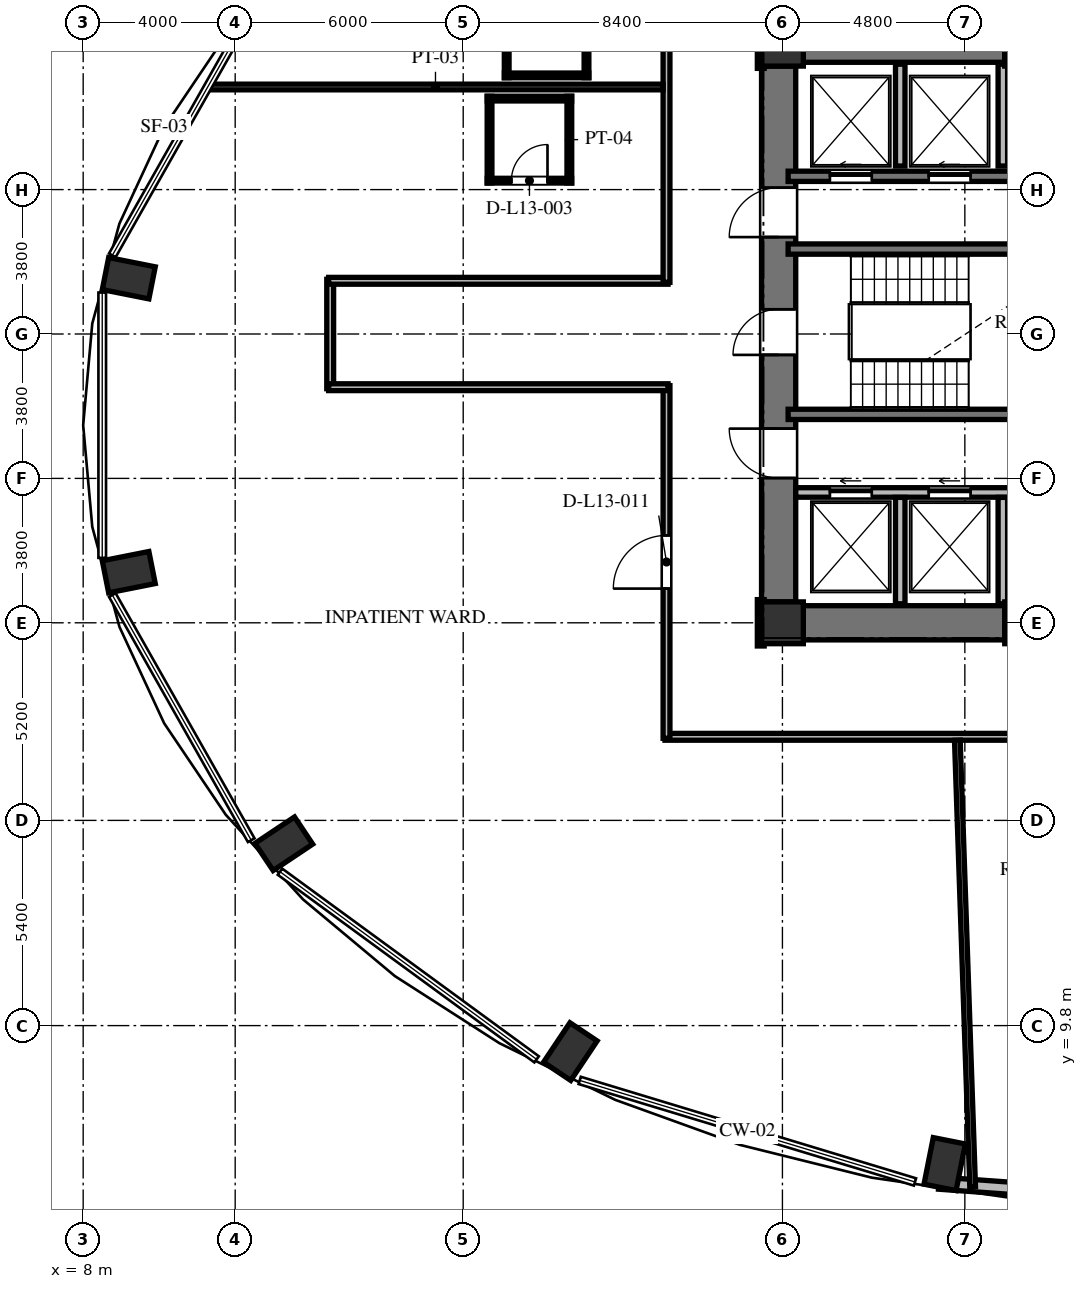
"""IFC4 building model, lengths in metres.
Left out: names, types, materials, properties, quantities, classifications, styles, units other than length and angle.
Written with IfcOpenShell. Run it as: python <this file> out.ifc"""

import sys

from ifc_helpers import new_model, si_unit, direction, frame, frame_2d, origin, origin_2d, place, context, subcontext, project, spatial, rectangle, extrude, element, fill, save


model = new_model("IFC4")
c1 = context("Model", 3, precision=1e-05, world=origin(), true_north=direction((0.0, 1.0)))
c2 = subcontext(c1, "Body", "Model", "MODEL_VIEW")
j1 = project(units=[si_unit("LENGTHUNIT", "METRE"), si_unit("PLANEANGLEUNIT", "RADIAN")], contexts=[c1])
p1 = place(None, origin())
s1 = spatial("IfcSite", under=j1, at=p1, CompositionType="ELEMENT")
p2 = place(p1, origin())
s2 = spatial("IfcBuilding", under=s1, at=p2, CompositionType="ELEMENT")
p3 = place(p2, frame((0.0, 0.0, 54.384)))
s3 = spatial("IfcBuildingStorey", under=s2, at=p3, CompositionType="ELEMENT", Elevation=54.384)
for number, where, z_axis, x_axis in (
    (1, (9.2, 29.468, 0.0), (0.0, 0.0, 1.0), (-0.981, 0.195, 0.0)),
    (2, (9.2, 21.732, 0.0), (0.0, 0.0, 1.0), (-0.981, -0.195, 0.0)),
    (3, (13.28, 14.586, 0.0), (0.0, 0.0, 1.0), (-0.831, -0.556, 0.0)),
    (4, (20.819, 9.116, 0.0), (0.0, 0.0, 1.0), (-0.556, -0.831, 0.0)),
    (5, (30.669, 6.156, 0.0), (0.0, 0.0, 1.0), (-0.195, -0.981, 0.0)),
):
    element("IfcColumn", number, at=place(p3, frame(where, z_axis=z_axis, x_axis=x_axis)), inside=s3, PredefinedType="COLUMN", context=c2, shape_type="SweptSolid", body=[
        extrude(rectangle(XDim=1.25, YDim=0.86, at=origin_2d()), origin(), (0.0, 0.0, 1.0), 3.648),
    ])
for number, where, z_axis, x_axis in (
    (6, (26.4, 20.4, 0.0), (0.0, 0.0, 1.0), (1.0, 0.0, 0.0)),
    (7, (32.8, 20.4, 0.0), (0.0, 0.0, 1.0), (1.0, 0.0, 0.0)),
    (8, (32.8, 35.6, 0.0), (0.0, 0.0, 1.0), (1.0, 0.0, 0.0)),
    (9, (26.4, 35.6, 0.0), (0.0, 0.0, 1.0), (1.0, 0.0, 0.0)),
):
    element("IfcColumn", number, at=place(p3, frame(where, z_axis=z_axis, x_axis=x_axis)), inside=s3, PredefinedType="COLUMN", context=c2, shape_type="SweptSolid", body=[
        extrude(rectangle(XDim=1.1, YDim=1.1, at=origin_2d()), origin(), (0.0, 0.0, 1.0), 3.648),
    ])
p4 = place(p3, frame((26.3, 20.95, 0.0), z_axis=(0.0, 0.0, 1.0), x_axis=(0.0, 1.0, 0.0)))
e10 = element("IfcWall", 10, at=p4, inside=s3, PredefinedType="SHEAR", context=c2, shape_type="SweptSolid", body=[
    extrude(rectangle(XDim=14.1, YDim=0.9, at=frame_2d((7.05, 0.0))), origin(), (0.0, 0.0, 1.0), 3.648),
])
p5 = place(p4, frame((6.5, 0.0, 0.0)))
e11 = element("IfcOpeningElement", 11, at=p5, cuts=e10, PredefinedType="OPENING", context=c2, shape_type="SweptSolid", body=[
    extrude(rectangle(XDim=1.2, YDim=2.15, at=frame_2d((0.6, 1.075))), frame((0.0, 0.46, 0.0), z_axis=(0.0, -1.0, 0.0), x_axis=(1.0, 0.0, 0.0)), (0.0, 0.0, 1.0), 0.92),
])
p6 = place(p4, frame((9.6, 0.0, 0.0)))
e12 = element("IfcOpeningElement", 12, at=p6, cuts=e10, PredefinedType="OPENING", context=c2, shape_type="SweptSolid", body=[
    extrude(rectangle(XDim=1.3, YDim=2.2, at=frame_2d((0.65, 1.1))), frame((0.0, 0.46, 0.0), z_axis=(0.0, -1.0, 0.0), x_axis=(1.0, 0.0, 0.0)), (0.0, 0.0, 1.0), 0.92),
])
p7 = place(p4, frame((3.26, 0.0, 0.0)))
e13 = element("IfcOpeningElement", 13, at=p7, cuts=e10, PredefinedType="OPENING", context=c2, shape_type="SweptSolid", body=[
    extrude(rectangle(XDim=1.3, YDim=2.2, at=frame_2d((0.65, 1.1))), frame((0.0, 0.46, 0.0), z_axis=(0.0, -1.0, 0.0), x_axis=(1.0, 0.0, 0.0)), (0.0, 0.0, 1.0), 0.92),
])
for number, where, z_axis, x_axis in (
    (14, (26.95, 20.4, 0.0), (0.0, 0.0, 1.0), (1.0, 0.0, 0.0)),
    (15, (26.95, 35.6, 0.0), (0.0, 0.0, 1.0), (1.0, 0.0, 0.0)),
):
    element("IfcWall", number, at=place(p3, frame(where, z_axis=z_axis, x_axis=x_axis)), inside=s3, PredefinedType="SHEAR", context=c2, shape_type="SweptSolid", body=[
        extrude(rectangle(XDim=5.3, YDim=0.9, at=frame_2d((2.65, 0.0))), origin(), (0.0, 0.0, 1.0), 3.648),
    ])
p8 = place(p3, frame((30.519, 5.654, 0.0), z_axis=(0.0, 0.0, 1.0), x_axis=(0.997421878774, -0.071760683825, 0.0)))
e16 = element("IfcWall", 16, at=p8, inside=s3, PredefinedType="SOLIDWALL", context=c2, shape_type="SweptSolid", body=[
    extrude(rectangle(XDim=5.675, YDim=0.32, at=frame_2d((2.837, 0.0))), origin(), (0.0, 0.0, 1.0), 3.428),
])
p9 = place(p8, frame((2.237, 0.0, 0.85)))
e17 = element("IfcOpeningElement", 17, at=p9, cuts=e16, PredefinedType="OPENING", context=c2, shape_type="SweptSolid", body=[
    extrude(rectangle(XDim=1.2, YDim=2.2, at=frame_2d((0.6, 1.1))), frame((0.0, 0.17, 0.0), z_axis=(0.0, -1.0, 0.0), x_axis=(1.0, 0.0, 0.0)), (0.0, 0.0, 1.0), 0.34),
])
for number, where, z_axis, x_axis in (
    (18, (26.55, 30.235, 0.0), (0.0, 0.0, 1.0), (1.0, 0.0, 0.0)),
    (19, (26.55, 25.885, 0.0), (0.0, 0.0, 1.0), (1.0, 0.0, 0.0)),
):
    element("IfcWall", number, at=place(p3, frame(where, z_axis=z_axis, x_axis=x_axis)), inside=s3, PredefinedType="SHEAR", context=c2, shape_type="SweptSolid", body=[
        extrude(rectangle(XDim=7.985, YDim=0.27, at=frame_2d((3.992, 0.0))), origin(), (0.0, 0.0, 1.0), 3.648),
    ])
p10 = place(p3, frame((26.55, 32.15, 0.0), z_axis=(0.0, 0.0, 1.0), x_axis=(1.0, 0.0, 0.0)))
e20 = element("IfcWall", 20, at=p10, inside=s3, PredefinedType="SHEAR", context=c2, shape_type="SweptSolid", body=[
    extrude(rectangle(XDim=16.4, YDim=0.27, at=frame_2d((8.2, 0.0))), origin(), (0.0, 0.0, 1.0), 3.648),
])
p11 = place(p10, frame((1.1, 0.0, 0.0)))
e21 = element("IfcOpeningElement", 21, at=p11, cuts=e20, PredefinedType="OPENING", context=c2, shape_type="SweptSolid", body=[
    extrude(rectangle(XDim=1.1, YDim=2.2, at=frame_2d((0.55, 1.1))), frame((0.0, 0.145, 0.0), z_axis=(0.0, -1.0, 0.0), x_axis=(1.0, 0.0, 0.0)), (0.0, 0.0, 1.0), 0.29),
])
p12 = place(p10, frame((3.7, 0.0, 0.0)))
e22 = element("IfcOpeningElement", 22, at=p12, cuts=e20, PredefinedType="OPENING", context=c2, shape_type="SweptSolid", body=[
    extrude(rectangle(XDim=1.1, YDim=2.2, at=frame_2d((0.55, 1.1))), frame((0.0, 0.145, 0.0), z_axis=(0.0, -1.0, 0.0), x_axis=(1.0, 0.0, 0.0)), (0.0, 0.0, 1.0), 0.29),
])
p13 = place(p10, frame((6.5, 0.0, 0.0)))
e23 = element("IfcOpeningElement", 23, at=p13, cuts=e20, PredefinedType="OPENING", context=c2, shape_type="SweptSolid", body=[
    extrude(rectangle(XDim=1.1, YDim=2.2, at=frame_2d((0.55, 1.1))), frame((0.0, 0.145, 0.0), z_axis=(0.0, -1.0, 0.0), x_axis=(1.0, 0.0, 0.0)), (0.0, 0.0, 1.0), 0.29),
])
p14 = place(p10, frame((9.1, 0.0, 0.0)))
e24 = element("IfcOpeningElement", 24, at=p14, cuts=e20, PredefinedType="OPENING", context=c2, shape_type="SweptSolid", body=[
    extrude(rectangle(XDim=1.1, YDim=2.2, at=frame_2d((0.55, 1.1))), frame((0.0, 0.145, 0.0), z_axis=(0.0, -1.0, 0.0), x_axis=(1.0, 0.0, 0.0)), (0.0, 0.0, 1.0), 0.29),
])
p15 = place(p10, frame((11.9, 0.0, 0.0)))
e25 = element("IfcOpeningElement", 25, at=p15, cuts=e20, PredefinedType="OPENING", context=c2, shape_type="SweptSolid", body=[
    extrude(rectangle(XDim=1.1, YDim=2.2, at=frame_2d((0.55, 1.1))), frame((0.0, 0.145, 0.0), z_axis=(0.0, -1.0, 0.0), x_axis=(1.0, 0.0, 0.0)), (0.0, 0.0, 1.0), 0.29),
])
p16 = place(p10, frame((14.5, 0.0, 0.0)))
e26 = element("IfcOpeningElement", 26, at=p16, cuts=e20, PredefinedType="OPENING", context=c2, shape_type="SweptSolid", body=[
    extrude(rectangle(XDim=1.1, YDim=2.2, at=frame_2d((0.55, 1.1))), frame((0.0, 0.145, 0.0), z_axis=(0.0, -1.0, 0.0), x_axis=(1.0, 0.0, 0.0)), (0.0, 0.0, 1.0), 0.29),
])
p17 = place(p3, frame((26.75, 23.83, 0.0), z_axis=(0.0, 0.0, 1.0), x_axis=(1.0, 0.0, 0.0)))
e27 = element("IfcWall", 27, at=p17, inside=s3, PredefinedType="SOLIDWALL", context=c2, shape_type="SweptSolid", body=[
    extrude(rectangle(XDim=16.2, YDim=0.25, at=frame_2d((8.1, 0.0))), origin(), (0.0, 0.0, 1.0), 3.428),
])
p18 = place(p17, frame((0.9, 0.0, 0.0)))
e28 = element("IfcOpeningElement", 28, at=p18, cuts=e27, PredefinedType="OPENING", context=c2, shape_type="SweptSolid", body=[
    extrude(rectangle(XDim=1.1, YDim=2.2, at=frame_2d((0.55, 1.1))), frame((0.0, 0.135, 0.0), z_axis=(0.0, -1.0, 0.0), x_axis=(1.0, 0.0, 0.0)), (0.0, 0.0, 1.0), 0.27),
])
p19 = place(p17, frame((3.5, 0.0, 0.0)))
e29 = element("IfcOpeningElement", 29, at=p19, cuts=e27, PredefinedType="OPENING", context=c2, shape_type="SweptSolid", body=[
    extrude(rectangle(XDim=1.1, YDim=2.2, at=frame_2d((0.55, 1.1))), frame((0.0, 0.135, 0.0), z_axis=(0.0, -1.0, 0.0), x_axis=(1.0, 0.0, 0.0)), (0.0, 0.0, 1.0), 0.27),
])
p20 = place(p17, frame((6.3, 0.0, 0.0)))
e30 = element("IfcOpeningElement", 30, at=p20, cuts=e27, PredefinedType="OPENING", context=c2, shape_type="SweptSolid", body=[
    extrude(rectangle(XDim=1.1, YDim=2.2, at=frame_2d((0.55, 1.1))), frame((0.0, 0.135, 0.0), z_axis=(0.0, -1.0, 0.0), x_axis=(1.0, 0.0, 0.0)), (0.0, 0.0, 1.0), 0.27),
])
p21 = place(p17, frame((8.9, 0.0, 0.0)))
e31 = element("IfcOpeningElement", 31, at=p21, cuts=e27, PredefinedType="OPENING", context=c2, shape_type="SweptSolid", body=[
    extrude(rectangle(XDim=1.1, YDim=2.2, at=frame_2d((0.55, 1.1))), frame((0.0, 0.135, 0.0), z_axis=(0.0, -1.0, 0.0), x_axis=(1.0, 0.0, 0.0)), (0.0, 0.0, 1.0), 0.27),
])
p22 = place(p17, frame((11.7, 0.0, 0.0)))
e32 = element("IfcOpeningElement", 32, at=p22, cuts=e27, PredefinedType="OPENING", context=c2, shape_type="SweptSolid", body=[
    extrude(rectangle(XDim=1.1, YDim=2.2, at=frame_2d((0.55, 1.1))), frame((0.0, 0.135, 0.0), z_axis=(0.0, -1.0, 0.0), x_axis=(1.0, 0.0, 0.0)), (0.0, 0.0, 1.0), 0.27),
])
p23 = place(p17, frame((14.15, 0.0, 0.0)))
e33 = element("IfcOpeningElement", 33, at=p23, cuts=e27, PredefinedType="OPENING", context=c2, shape_type="SweptSolid", body=[
    extrude(rectangle(XDim=1.4, YDim=2.3, at=frame_2d((0.7, 1.15))), frame((0.0, 0.135, 0.0), z_axis=(0.0, -1.0, 0.0), x_axis=(1.0, 0.0, 0.0)), (0.0, 0.0, 1.0), 0.27),
])
p24 = place(p3, frame((29.5, 32.42, 0.0), z_axis=(0.0, 0.0, 1.0), x_axis=(0.0, 1.0, 0.0)))
e34 = element("IfcWall", 34, at=p24, inside=s3, PredefinedType="SOLIDWALL", context=c2, shape_type="SweptSolid", body=[
    extrude(rectangle(XDim=2.68, YDim=0.25, at=frame_2d((1.34, 0.0))), origin(), (0.0, 0.0, 1.0), 3.428),
])
p25 = place(p3, frame((29.5, 20.9, 0.0), z_axis=(0.0, 0.0, 1.0), x_axis=(0.0, 1.0, 0.0)))
e35 = element("IfcWall", 35, at=p25, inside=s3, PredefinedType="SOLIDWALL", context=c2, shape_type="SweptSolid", body=[
    extrude(rectangle(XDim=2.8, YDim=0.25, at=frame_2d((1.4, 0.0))), origin(), (0.0, 0.0, 1.0), 3.428),
])
p26 = place(p3, frame((32.2, 32.42, 0.0), z_axis=(0.0, 0.0, 1.0), x_axis=(0.0, 1.0, 0.0)))
e36 = element("IfcWall", 36, at=p26, inside=s3, PredefinedType="SOLIDWALL", context=c2, shape_type="SweptSolid", body=[
    extrude(rectangle(XDim=2.68, YDim=0.25, at=frame_2d((1.34, 0.0))), origin(), (0.0, 0.0, 1.0), 3.428),
])
p27 = place(p3, frame((32.2, 20.9, 0.0), z_axis=(0.0, 0.0, 1.0), x_axis=(0.0, 1.0, 0.0)))
e37 = element("IfcWall", 37, at=p27, inside=s3, PredefinedType="SOLIDWALL", context=c2, shape_type="SweptSolid", body=[
    extrude(rectangle(XDim=2.8, YDim=0.25, at=frame_2d((1.4, 0.0))), origin(), (0.0, 0.0, 1.0), 3.428),
])
p28 = place(p3, frame((14.5, 26.56, 0.0), z_axis=(0.0, 0.0, 1.0), x_axis=(0.0, 1.0, 0.0)))
e38 = element("IfcWall", 38, at=p28, inside=s3, PredefinedType="PARTITIONING", context=c2, shape_type="SweptSolid", body=[
    extrude(rectangle(XDim=2.88, YDim=0.18, at=frame_2d((1.44, 0.0))), origin(), (0.0, 0.0, 1.0), 3.428),
])
p29 = place(p3, frame((14.46, 29.4, 0.0), z_axis=(0.0, 0.0, 1.0), x_axis=(1.0, 0.0, 0.0)))
e39 = element("IfcWall", 39, at=p29, inside=s3, PredefinedType="PARTITIONING", context=c2, shape_type="SweptSolid", body=[
    extrude(rectangle(XDim=8.93, YDim=0.18, at=frame_2d((4.465, 0.0))), origin(), (0.0, 0.0, 1.0), 3.428),
])
p30 = place(p3, frame((23.35, 29.36, 0.0), z_axis=(0.0, 0.0, 1.0), x_axis=(0.0, 1.0, 0.0)))
e40 = element("IfcWall", 40, at=p30, inside=s3, PredefinedType="PARTITIONING", context=c2, shape_type="SweptSolid", body=[
    extrude(rectangle(XDim=9.43, YDim=0.18, at=frame_2d((4.715, 0.0))), origin(), (0.0, 0.0, 1.0), 3.428),
])
for number, where, z_axis, x_axis in (
    (41, (25.83, 36.21, 0.0), (0.0, 0.0, 1.0), (0.0, -1.0, 0.0)),
    (42, (25.83, 21.01, 0.0), (0.0, 0.0, 1.0), (0.0, -1.0, 0.0)),
):
    element("IfcWall", number, at=place(p3, frame(where, z_axis=z_axis, x_axis=x_axis)), inside=s3, PredefinedType="PARTITIONING", context=c2, shape_type="SweptSolid", body=[
        extrude(rectangle(XDim=1.22, YDim=0.18, at=frame_2d((0.61, 0.0))), origin(), (0.0, 0.0, 1.0), 3.428),
    ])
p31 = place(p3, frame((45.24, 17.4, 0.0), z_axis=(0.0, 0.0, 1.0), x_axis=(-1.0, 0.0, 0.0)))
e43 = element("IfcWall", 43, at=p31, inside=s3, PredefinedType="PARTITIONING", context=c2, shape_type="SweptSolid", body=[
    extrude(rectangle(XDim=21.93, YDim=0.18, at=frame_2d((10.965, 0.0))), origin(), (0.0, 0.0, 1.0), 3.053),
])
p32 = place(p31, frame((9.289, 0.0, 0.0)))
e44 = element("IfcOpeningElement", 44, at=p32, cuts=e43, PredefinedType="OPENING", context=c2, shape_type="SweptSolid", body=[
    extrude(rectangle(XDim=1.4, YDim=2.2, at=frame_2d((0.7, 1.1))), frame((0.0, 0.1, 0.0), z_axis=(0.0, -1.0, 0.0), x_axis=(1.0, 0.0, 0.0)), (0.0, 0.0, 1.0), 0.2),
])
p33 = place(p31, frame((2.329, 0.0, 0.0)))
e45 = element("IfcOpeningElement", 45, at=p33, cuts=e43, PredefinedType="OPENING", context=c2, shape_type="SweptSolid", body=[
    extrude(rectangle(XDim=1.4, YDim=2.2, at=frame_2d((0.7, 1.1))), frame((0.0, 0.1, 0.0), z_axis=(0.0, -1.0, 0.0), x_axis=(1.0, 0.0, 0.0)), (0.0, 0.0, 1.0), 0.2),
])
p34 = place(p3, frame((23.35, 17.36, 0.0), z_axis=(0.0, 0.0, 1.0), x_axis=(0.0, 1.0, 0.0)))
e46 = element("IfcWall", 46, at=p34, inside=s3, PredefinedType="PARTITIONING", context=c2, shape_type="SweptSolid", body=[
    extrude(rectangle(XDim=9.28, YDim=0.18, at=frame_2d((4.64, 0.0))), origin(), (0.0, 0.0, 1.0), 3.428),
])
p35 = place(p34, frame((3.94, 0.0, 0.0)))
e47 = element("IfcOpeningElement", 47, at=p35, cuts=e46, PredefinedType="OPENING", context=c2, shape_type="SweptSolid", body=[
    extrude(rectangle(XDim=1.4, YDim=2.2, at=frame_2d((0.7, 1.1))), frame((0.0, 0.1, 0.0), z_axis=(0.0, -1.0, 0.0), x_axis=(1.0, 0.0, 0.0)), (0.0, 0.0, 1.0), 0.2),
])
p36 = place(p3, frame((23.39, 26.6, 0.0), z_axis=(0.0, 0.0, 1.0), x_axis=(-1.0, 0.0, 0.0)))
e48 = element("IfcWall", 48, at=p36, inside=s3, PredefinedType="PARTITIONING", context=c2, shape_type="SweptSolid", body=[
    extrude(rectangle(XDim=8.93, YDim=0.18, at=frame_2d((4.465, 0.0))), origin(), (0.0, 0.0, 1.0), 3.428),
])
p37 = place(p3, frame((11.281, 34.5, 0.0), z_axis=(0.0, 0.0, 1.0), x_axis=(1.0, 0.0, 0.0)))
e49 = element("IfcWall", 49, at=p37, inside=s3, PredefinedType="PARTITIONING", context=c2, shape_type="SweptSolid", body=[
    extrude(rectangle(XDim=11.979, YDim=0.15, at=frame_2d((5.99, 0.0))), origin(), (0.0, 0.0, 1.0), 3.428),
])
p38 = place(p3, frame((31.405, 5.559, 0.0), z_axis=(0.0, 0.0, 1.0), x_axis=(-0.034219123574, 0.9994143543, 0.0)))
e50 = element("IfcWall", 50, at=p38, inside=s3, PredefinedType="PARTITIONING", context=c2, shape_type="SweptSolid", body=[
    extrude(rectangle(XDim=11.758, YDim=0.15, at=frame_2d((5.879, 0.0))), origin(), (0.0, 0.0, 1.0), 2.813),
])
p39 = place(p3, frame((18.633, 34.195, 0.0), z_axis=(0.0, 0.0, 1.0), x_axis=(1.0, 0.0, 0.0)))
e51 = element("IfcWall", 51, at=p39, inside=s3, PredefinedType="PARTITIONING", context=c2, shape_type="SweptSolid", body=[
    extrude(rectangle(XDim=2.22, YDim=0.125, at=frame_2d((1.11, 0.0))), origin(), (0.0, 0.0, 1.0), 3.428),
])
p40 = place(p3, frame((18.633, 32.035, 0.0), z_axis=(0.0, 0.0, 1.0), x_axis=(1.0, 0.0, 0.0)))
e52 = element("IfcWall", 52, at=p40, inside=s3, PredefinedType="PARTITIONING", context=c2, shape_type="SweptSolid", body=[
    extrude(rectangle(XDim=2.22, YDim=0.125, at=frame_2d((1.11, 0.0))), origin(), (0.0, 0.0, 1.0), 3.428),
])
p41 = place(p40, frame((0.635, 0.0, 0.0)))
e53 = element("IfcOpeningElement", 53, at=p41, cuts=e52, PredefinedType="OPENING", context=c2, shape_type="SweptSolid", body=[
    extrude(rectangle(XDim=0.95, YDim=2.1, at=frame_2d((0.475, 1.05))), frame((0.0, 0.073, 0.0), z_axis=(0.0, -1.0, 0.0), x_axis=(1.0, 0.0, 0.0)), (0.0, 0.0, 1.0), 0.145),
])
for number, where, z_axis, x_axis in (
    (54, (20.793, 31.975, 0.0), (0.0, 0.0, 1.0), (0.0, 1.0, 0.0)),
    (55, (18.693, 31.975, 0.0), (0.0, 0.0, 1.0), (0.0, 1.0, 0.0)),
):
    element("IfcWall", number, at=place(p3, frame(where, z_axis=z_axis, x_axis=x_axis)), inside=s3, PredefinedType="PARTITIONING", context=c2, shape_type="SweptSolid", body=[
        extrude(rectangle(XDim=2.28, YDim=0.125, at=frame_2d((1.14, 0.0))), origin(), (0.0, 0.0, 1.0), 3.428),
    ])
p42 = place(p3, frame((19.084, 34.805, 0.0), z_axis=(0.0, 0.0, 1.0), x_axis=(1.0, 0.0, 0.0)))
e56 = element("IfcWall", 56, at=p42, inside=s3, PredefinedType="PARTITIONING", context=c2, shape_type="SweptSolid", body=[
    extrude(rectangle(XDim=2.22, YDim=0.125, at=frame_2d((1.11, 0.0))), origin(), (0.0, 0.0, 1.0), 3.428),
])
for number, where, z_axis, x_axis in (
    (57, (21.244, 34.745, 0.0), (0.0, 0.0, 1.0), (0.0, 1.0, 0.0)),
    (58, (19.144, 34.745, 0.0), (0.0, 0.0, 1.0), (0.0, 1.0, 0.0)),
):
    element("IfcWall", number, at=place(p3, frame(where, z_axis=z_axis, x_axis=x_axis)), inside=s3, PredefinedType="PARTITIONING", context=c2, shape_type="SweptSolid", body=[
        extrude(rectangle(XDim=2.28, YDim=0.125, at=frame_2d((1.14, 0.0))), origin(), (0.0, 0.0, 1.0), 3.428),
    ])
p43 = place(p5, origin())
e59 = element("IfcDoor", 59, at=p43, inside=s3, OperationType="SINGLE_SWING_LEFT", PredefinedType="DOOR", context=c2, shape_type="SweptSolid", body=[
    extrude(rectangle(XDim=1.2, YDim=2.15, at=frame_2d((0.6, 1.075))), frame((0.0, 0.025, 0.0), z_axis=(0.0, -1.0, 0.0), x_axis=(1.0, 0.0, 0.0)), (0.0, 0.0, 1.0), 0.05),
])
fill(e11, e59)
p44 = place(p6, origin())
e60 = element("IfcDoor", 60, at=p44, inside=s3, OperationType="SINGLE_SWING_LEFT", PredefinedType="DOOR", context=c2, shape_type="SweptSolid", body=[
    extrude(rectangle(XDim=1.3, YDim=2.2, at=frame_2d((0.65, 1.1))), frame((0.0, 0.025, 0.0), z_axis=(0.0, -1.0, 0.0), x_axis=(1.0, 0.0, 0.0)), (0.0, 0.0, 1.0), 0.05),
])
fill(e12, e60)
p45 = place(p7, origin())
e61 = element("IfcDoor", 61, at=p45, inside=s3, OperationType="SINGLE_SWING_RIGHT", PredefinedType="DOOR", context=c2, shape_type="SweptSolid", body=[
    extrude(rectangle(XDim=1.3, YDim=2.2, at=frame_2d((0.65, 1.1))), frame((0.0, 0.025, 0.0), z_axis=(0.0, -1.0, 0.0), x_axis=(1.0, 0.0, 0.0)), (0.0, 0.0, 1.0), 0.05),
])
fill(e13, e61)
p46 = place(p11, origin())
e62 = element("IfcDoor", 62, at=p46, inside=s3, OperationType="SLIDING_TO_LEFT", PredefinedType="DOOR", context=c2, shape_type="SweptSolid", body=[
    extrude(rectangle(XDim=1.1, YDim=2.2, at=frame_2d((0.55, 1.1))), frame((0.0, 0.025, 0.0), z_axis=(0.0, -1.0, 0.0), x_axis=(1.0, 0.0, 0.0)), (0.0, 0.0, 1.0), 0.05),
])
fill(e21, e62)
p47 = place(p12, origin())
e63 = element("IfcDoor", 63, at=p47, inside=s3, OperationType="SLIDING_TO_LEFT", PredefinedType="DOOR", context=c2, shape_type="SweptSolid", body=[
    extrude(rectangle(XDim=1.1, YDim=2.2, at=frame_2d((0.55, 1.1))), frame((0.0, 0.025, 0.0), z_axis=(0.0, -1.0, 0.0), x_axis=(1.0, 0.0, 0.0)), (0.0, 0.0, 1.0), 0.05),
])
fill(e22, e63)
p48 = place(p18, origin())
e64 = element("IfcDoor", 64, at=p48, inside=s3, OperationType="SLIDING_TO_LEFT", PredefinedType="DOOR", context=c2, shape_type="SweptSolid", body=[
    extrude(rectangle(XDim=1.1, YDim=2.2, at=frame_2d((0.55, 1.1))), frame((0.0, 0.025, 0.0), z_axis=(0.0, -1.0, 0.0), x_axis=(1.0, 0.0, 0.0)), (0.0, 0.0, 1.0), 0.05),
])
fill(e28, e64)
p49 = place(p19, origin())
e65 = element("IfcDoor", 65, at=p49, inside=s3, OperationType="SLIDING_TO_LEFT", PredefinedType="DOOR", context=c2, shape_type="SweptSolid", body=[
    extrude(rectangle(XDim=1.1, YDim=2.2, at=frame_2d((0.55, 1.1))), frame((0.0, 0.025, 0.0), z_axis=(0.0, -1.0, 0.0), x_axis=(1.0, 0.0, 0.0)), (0.0, 0.0, 1.0), 0.05),
])
fill(e29, e65)
p50 = place(p41, origin())
e66 = element("IfcDoor", 66, at=p50, inside=s3, OperationType="SINGLE_SWING_RIGHT", PredefinedType="DOOR", context=c2, shape_type="SweptSolid", body=[
    extrude(rectangle(XDim=0.95, YDim=2.1, at=frame_2d((0.475, 1.05))), frame((0.0, 0.025, 0.0), z_axis=(0.0, -1.0, 0.0), x_axis=(1.0, 0.0, 0.0)), (0.0, 0.0, 1.0), 0.05),
])
fill(e53, e66)
p51 = place(p35, origin())
e67 = element("IfcDoor", 67, at=p51, inside=s3, OperationType="SINGLE_SWING_LEFT", PredefinedType="DOOR", context=c2, shape_type="SweptSolid", body=[
    extrude(rectangle(XDim=1.4, YDim=2.2, at=frame_2d((0.7, 1.1))), frame((0.0, 0.025, 0.0), z_axis=(0.0, -1.0, 0.0), x_axis=(1.0, 0.0, 0.0)), (0.0, 0.0, 1.0), 0.05),
])
fill(e47, e67)
save(model, sys.argv[1])
